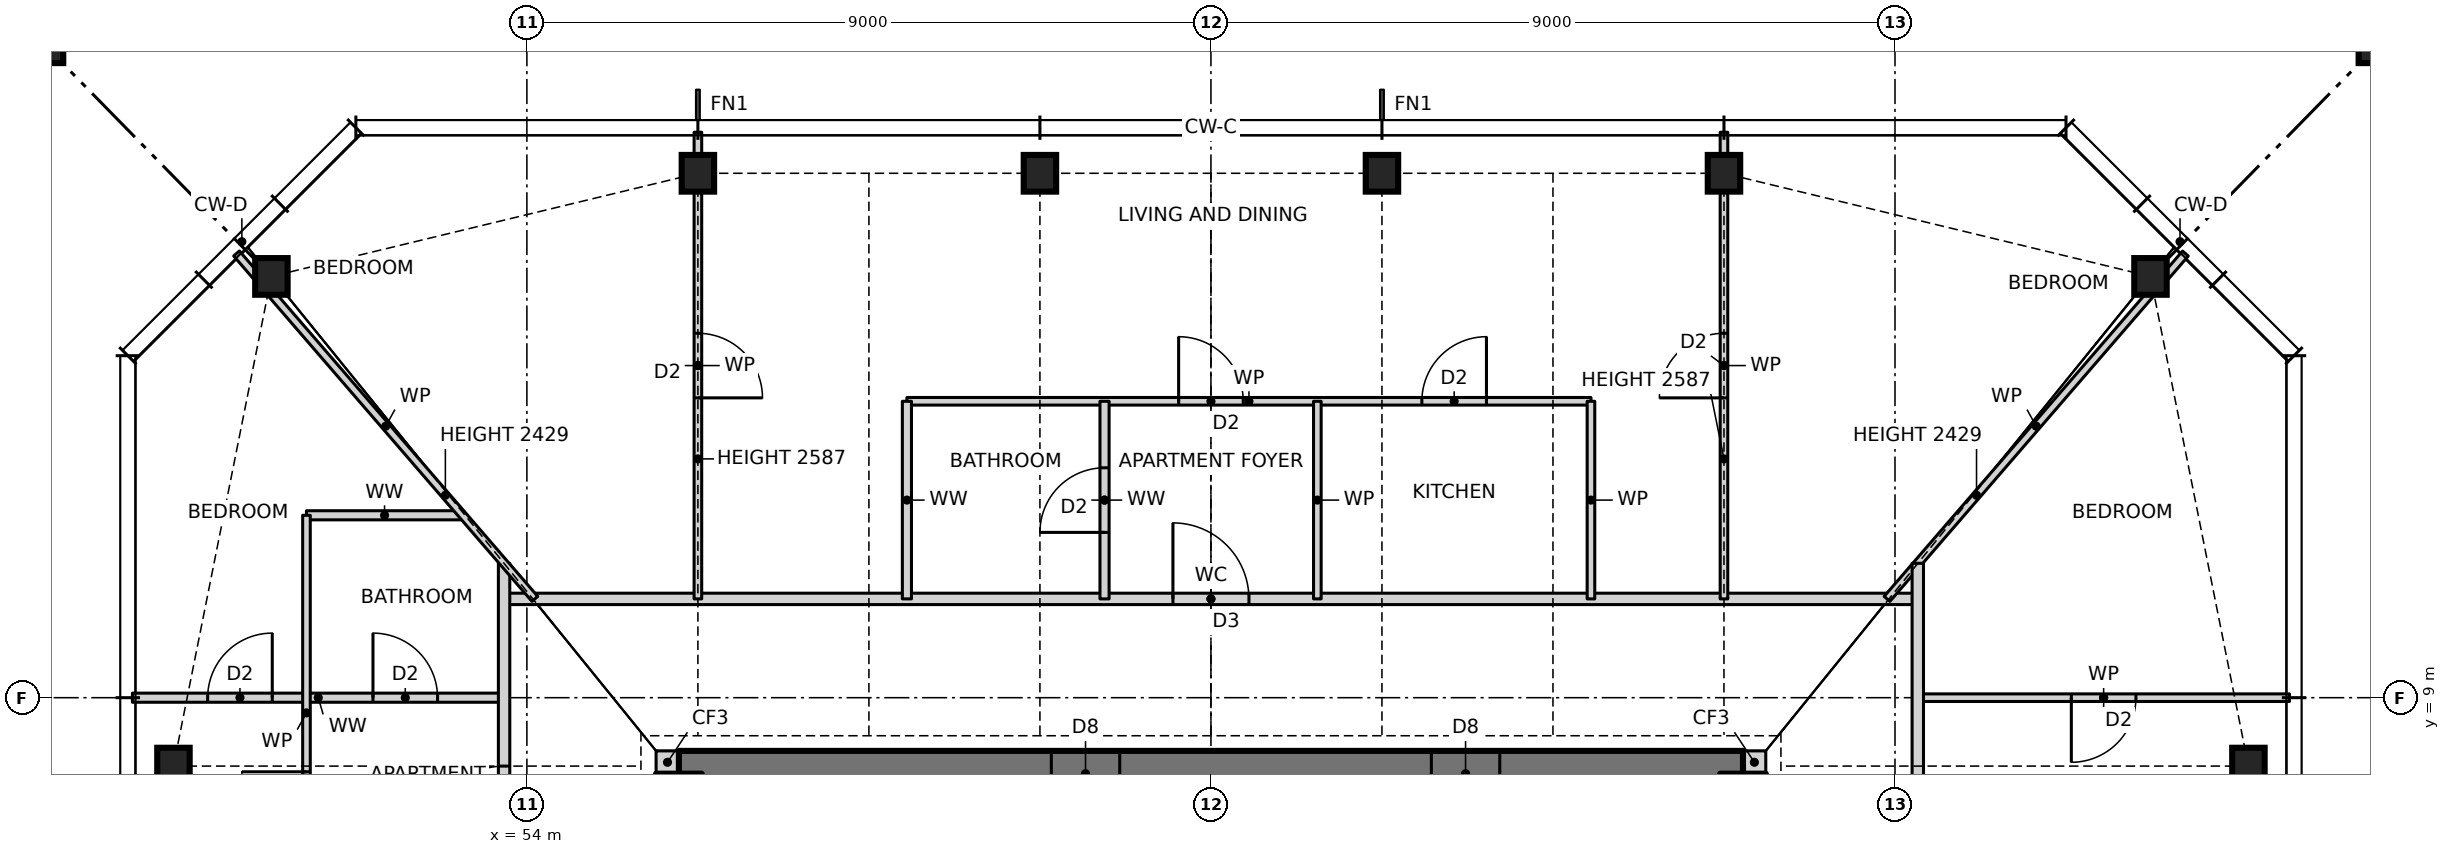
"""IFC4 building model, lengths in metres.
Left out: names, types, materials, properties, quantities, classifications, styles, units other than length and angle.
Written with IfcOpenShell. Run it as: python <this file> out.ifc"""

import sys

from ifc_helpers import new_model, si_unit, direction, frame, frame_2d, origin, origin_2d, place, context, subcontext, project, spatial, rectangle, hollow_rectangle, i_section, extrude, element, fill, save


model = new_model("IFC4")
c1 = context("Model", 3, precision=1e-05, world=origin(), true_north=direction((0.0, 1.0)))
c2 = subcontext(c1, "Body", "Model", "MODEL_VIEW")
j1 = project(units=[si_unit("LENGTHUNIT", "METRE"), si_unit("PLANEANGLEUNIT", "RADIAN")], contexts=[c1])
p1 = place(None, origin())
s1 = spatial("IfcSite", under=j1, at=p1, CompositionType="ELEMENT")
p2 = place(p1, origin())
s2 = spatial("IfcBuilding", under=s1, at=p2, CompositionType="ELEMENT")
p3 = place(p2, frame((0.0, 0.0, 87.5)))
s3 = spatial("IfcBuildingStorey", under=s2, at=p3, CompositionType="ELEMENT", Elevation=87.5)
for number, where, z_axis, x_axis in (
    (1, (76.65, 8.1, 0.0), (0.0, 0.0, 1.0), (1.0, 0.0, 0.0)),
    (2, (75.361, 14.543, 0.0), (0.0, 0.0, 1.0), (1.0, 0.0, 0.0)),
    (3, (69.75, 15.9, 0.0), (0.0, 0.0, 1.0), (1.0, 0.0, 0.0)),
    (4, (65.25, 15.9, 0.0), (0.0, 0.0, 1.0), (1.0, 0.0, 0.0)),
    (5, (60.75, 15.9, 0.0), (0.0, 0.0, 1.0), (1.0, 0.0, 0.0)),
    (6, (56.25, 15.9, 0.0), (0.0, 0.0, 1.0), (1.0, 0.0, 0.0)),
    (7, (50.639, 14.543, 0.0), (0.0, 0.0, 1.0), (1.0, 0.0, 0.0)),
    (8, (49.35, 8.1, 0.0), (0.0, 0.0, 1.0), (1.0, 0.0, 0.0)),
):
    element("IfcColumn", number, at=place(p3, frame(where, z_axis=z_axis, x_axis=x_axis)), inside=s3, PredefinedType="COLUMN", context=c2, shape_type="SweptSolid", body=[
        extrude(i_section(OverallWidth=0.427, OverallDepth=0.483, WebThickness=0.051, FlangeThickness=0.082, at=origin_2d()), origin(), (0.0, 0.0, 1.0), 3.5),
    ])
for number, where, z_axis, x_axis in (
    (9, (78.65, 17.9, 0.0), (0.0, 0.0, 1.0), (1.0, 0.0, 0.0)),
    (10, (47.35, 17.9, 0.0), (0.0, 0.0, 1.0), (1.0, 0.0, 0.0)),
):
    element("IfcColumn", number, at=place(p3, frame(where, z_axis=z_axis, x_axis=x_axis)), inside=s3, PredefinedType="COLUMN", context=c2, shape_type="SweptSolid", body=[
        extrude(hollow_rectangle(XDim=1.1, YDim=1.1, WallThickness=0.06, at=origin_2d()), origin(), (0.0, 0.0, 1.0), 3.5),
    ])
for number, where, z_axis, x_axis in (
    (11, (70.0, 8.15, 0.0), (0.0, 0.0, 1.0), (1.0, 0.0, 0.0)),
    (12, (55.7, 8.15, 0.0), (0.0, 0.0, 1.0), (1.0, 0.0, 0.0)),
):
    element("IfcWall", number, at=place(p3, frame(where, z_axis=z_axis, x_axis=x_axis)), inside=s3, PredefinedType="SOLIDWALL", context=c2, shape_type="SweptSolid", body=[
        extrude(rectangle(XDim=0.3, YDim=0.3, at=frame_2d((0.15, 0.0))), origin(), (0.0, 0.0, 1.0), 3.5),
    ])
p4 = place(p3, frame((70.0, 8.0, 0.0), z_axis=(0.0, 0.0, 1.0), x_axis=(-1.0, 0.0, 0.0)))
e13 = element("IfcWall", 13, at=p4, inside=s3, PredefinedType="SHEAR", context=c2, shape_type="SweptSolid", body=[
    extrude(rectangle(XDim=14.0, YDim=0.6, at=frame_2d((7.0, 0.0))), origin(), (0.0, 0.0, 1.0), 3.5),
])
p5 = place(p4, frame((8.2, 0.0, 0.0)))
e14 = element("IfcOpeningElement", 14, at=p5, cuts=e13, PredefinedType="OPENING", context=c2, shape_type="SweptSolid", body=[
    extrude(rectangle(XDim=0.9, YDim=2.1, at=frame_2d((0.45, 1.05))), frame((0.0, 0.31, 0.0), z_axis=(0.0, -1.0, 0.0), x_axis=(1.0, 0.0, 0.0)), (0.0, 0.0, 1.0), 0.62),
])
p6 = place(p4, frame((3.2, 0.0, 0.0)))
e15 = element("IfcOpeningElement", 15, at=p6, cuts=e13, PredefinedType="OPENING", context=c2, shape_type="SweptSolid", body=[
    extrude(rectangle(XDim=0.9, YDim=2.1, at=frame_2d((0.45, 1.05))), frame((0.0, 0.31, 0.0), z_axis=(0.0, -1.0, 0.0), x_axis=(1.0, 0.0, 0.0)), (0.0, 0.0, 1.0), 0.62),
])
p7 = place(p3, frame((48.81, 9.0, 0.0), z_axis=(0.0, 0.0, 1.0), x_axis=(1.0, 0.0, 0.0)))
e16 = element("IfcWall", 16, at=p7, inside=s3, PredefinedType="PARTITIONING", context=c2, shape_type="SweptSolid", body=[
    extrude(rectangle(XDim=4.89, YDim=0.12, at=frame_2d((2.445, 0.0))), origin(), (0.0, 0.0, 1.0), 3.27),
])
p8 = place(p7, frame((3.165, 0.0, 0.0)))
e17 = element("IfcOpeningElement", 17, at=p8, cuts=e16, PredefinedType="OPENING", context=c2, shape_type="SweptSolid", body=[
    extrude(rectangle(XDim=0.85, YDim=2.1, at=frame_2d((0.425, 1.05))), frame((0.0, 0.07, 0.0), z_axis=(0.0, -1.0, 0.0), x_axis=(1.0, 0.0, 0.0)), (0.0, 0.0, 1.0), 0.14),
])
p9 = place(p7, frame((0.99, 0.0, 0.0)))
e18 = element("IfcOpeningElement", 18, at=p9, cuts=e16, PredefinedType="OPENING", context=c2, shape_type="SweptSolid", body=[
    extrude(rectangle(XDim=0.85, YDim=2.1, at=frame_2d((0.425, 1.05))), frame((0.0, 0.07, 0.0), z_axis=(0.0, -1.0, 0.0), x_axis=(1.0, 0.0, 0.0)), (0.0, 0.0, 1.0), 0.14),
])
p10 = place(p3, frame((72.3, 9.0, 0.0), z_axis=(0.0, 0.0, 1.0), x_axis=(1.0, 0.0, 0.0)))
e19 = element("IfcWall", 19, at=p10, inside=s3, PredefinedType="PARTITIONING", context=c2, shape_type="SweptSolid", body=[
    extrude(rectangle(XDim=4.89, YDim=0.1, at=frame_2d((2.445, 0.0))), origin(), (0.0, 0.0, 1.0), 3.27),
])
p11 = place(p10, frame((2.02, 0.0, 0.0)))
e20 = element("IfcOpeningElement", 20, at=p11, cuts=e19, PredefinedType="OPENING", context=c2, shape_type="SweptSolid", body=[
    extrude(rectangle(XDim=0.85, YDim=2.1, at=frame_2d((0.425, 1.05))), frame((0.0, 0.06, 0.0), z_axis=(0.0, -1.0, 0.0), x_axis=(1.0, 0.0, 0.0)), (0.0, 0.0, 1.0), 0.12),
])
p12 = place(p3, frame((53.7, 10.3, 0.0), z_axis=(0.0, 0.0, 1.0), x_axis=(1.0, 0.0, 0.0)))
e21 = element("IfcWall", 21, at=p12, inside=s3, PredefinedType="PARTITIONING", context=c2, shape_type="SweptSolid", body=[
    extrude(rectangle(XDim=18.6, YDim=0.15, at=frame_2d((9.3, 0.0))), origin(), (0.0, 0.0, 1.0), 3.27),
])
p13 = place(p12, frame((8.8, 0.0, 0.0)))
e22 = element("IfcOpeningElement", 22, at=p13, cuts=e21, PredefinedType="OPENING", context=c2, shape_type="SweptSolid", body=[
    extrude(rectangle(XDim=1.0, YDim=2.1, at=frame_2d((0.5, 1.05))), frame((0.0, 0.085, 0.0), z_axis=(0.0, -1.0, 0.0), x_axis=(1.0, 0.0, 0.0)), (0.0, 0.0, 1.0), 0.17),
])
p14 = place(p3, frame((51.1, 11.4, 0.0), z_axis=(0.0, 0.0, 1.0), x_axis=(1.0, 0.0, 0.0)))
e23 = element("IfcWall", 23, at=p14, inside=s3, PredefinedType="PARTITIONING", context=c2, shape_type="SweptSolid", body=[
    extrude(rectangle(XDim=2.055, YDim=0.12, at=frame_2d((1.027, 0.0))), origin(), (0.0, 0.0, 1.0), 3.27),
])
p15 = place(p3, frame((59.0, 12.9, 0.0), z_axis=(0.0, 0.0, 1.0), x_axis=(1.0, 0.0, 0.0)))
e24 = element("IfcWall", 24, at=p15, inside=s3, PredefinedType="PARTITIONING", context=c2, shape_type="SweptSolid", body=[
    extrude(rectangle(XDim=9.0, YDim=0.1, at=frame_2d((4.5, 0.0))), origin(), (0.0, 0.0, 1.0), 3.27),
])
p16 = place(p15, frame((6.775, 0.0, 0.0)))
e25 = element("IfcOpeningElement", 25, at=p16, cuts=e24, PredefinedType="OPENING", context=c2, shape_type="SweptSolid", body=[
    extrude(rectangle(XDim=0.85, YDim=2.1, at=frame_2d((0.425, 1.05))), frame((0.0, 0.06, 0.0), z_axis=(0.0, -1.0, 0.0), x_axis=(1.0, 0.0, 0.0)), (0.0, 0.0, 1.0), 0.12),
])
p17 = place(p15, frame((3.575, 0.0, 0.0)))
e26 = element("IfcOpeningElement", 26, at=p17, cuts=e24, PredefinedType="OPENING", context=c2, shape_type="SweptSolid", body=[
    extrude(rectangle(XDim=0.85, YDim=2.1, at=frame_2d((0.425, 1.05))), frame((0.0, 0.06, 0.0), z_axis=(0.0, -1.0, 0.0), x_axis=(1.0, 0.0, 0.0)), (0.0, 0.0, 1.0), 0.12),
])
p18 = place(p3, frame((71.895, 10.3, 0.0), z_axis=(0.0, 0.0, 1.0), x_axis=(0.65378286253, 0.756682211144, 0.0)))
e27 = element("IfcWall", 27, at=p18, inside=s3, PredefinedType="PARTITIONING", context=c2, shape_type="SweptSolid", body=[
    extrude(rectangle(XDim=6.005, YDim=0.1, at=frame_2d((3.002, 0.0))), origin(), (0.0, 0.0, 1.0), 2.429),
])
p19 = place(p3, frame((72.3, -10.9, 0.0), z_axis=(0.0, 0.0, 1.0), x_axis=(0.0, 1.0, 0.0)))
e28 = element("IfcWall", 28, at=p19, inside=s3, PredefinedType="PARTITIONING", context=c2, shape_type="SweptSolid", body=[
    extrude(rectangle(XDim=21.668, YDim=0.15, at=frame_2d((10.834, 0.0))), origin(), (0.0, 0.0, 1.0), 3.27),
])
p20 = place(p19, frame((10.4, 0.0, 0.0)))
e29 = element("IfcOpeningElement", 29, at=p20, cuts=e28, PredefinedType="OPENING", context=c2, shape_type="SweptSolid", body=[
    extrude(rectangle(XDim=1.0, YDim=2.1, at=frame_2d((0.5, 1.05))), frame((0.0, 0.085, 0.0), z_axis=(0.0, -1.0, 0.0), x_axis=(1.0, 0.0, 0.0)), (0.0, 0.0, 1.0), 0.17),
])
p21 = place(p3, frame((69.75, 10.3, 0.0), z_axis=(0.0, 0.0, 1.0), x_axis=(0.0, 1.0, 0.0)))
e30 = element("IfcWall", 30, at=p21, inside=s3, PredefinedType="PARTITIONING", context=c2, shape_type="SweptSolid", body=[
    extrude(rectangle(XDim=6.14, YDim=0.1, at=frame_2d((3.07, 0.0))), origin(), (0.0, 0.0, 1.0), 2.587),
])
p22 = place(p21, frame((2.645, 0.0, 0.0)))
e31 = element("IfcOpeningElement", 31, at=p22, cuts=e30, PredefinedType="OPENING", context=c2, shape_type="SweptSolid", body=[
    extrude(rectangle(XDim=0.85, YDim=2.1, at=frame_2d((0.425, 1.05))), frame((0.0, 0.06, 0.0), z_axis=(0.0, -1.0, 0.0), x_axis=(1.0, 0.0, 0.0)), (0.0, 0.0, 1.0), 0.12),
])
for number, where, z_axis, x_axis in (
    (32, (68.0, 10.3, 0.0), (0.0, 0.0, 1.0), (0.0, 1.0, 0.0)),
    (33, (64.4, 10.3, 0.0), (0.0, 0.0, 1.0), (0.0, 1.0, 0.0)),
):
    element("IfcWall", number, at=place(p3, frame(where, z_axis=z_axis, x_axis=x_axis)), inside=s3, PredefinedType="PARTITIONING", context=c2, shape_type="SweptSolid", body=[
        extrude(rectangle(XDim=2.6, YDim=0.1, at=frame_2d((1.3, 0.0))), origin(), (0.0, 0.0, 1.0), 3.27),
    ])
p23 = place(p3, frame((61.6, 10.3, 0.0), z_axis=(0.0, 0.0, 1.0), x_axis=(0.0, 1.0, 0.0)))
e34 = element("IfcWall", 34, at=p23, inside=s3, PredefinedType="PARTITIONING", context=c2, shape_type="SweptSolid", body=[
    extrude(rectangle(XDim=2.6, YDim=0.12, at=frame_2d((1.3, 0.0))), origin(), (0.0, 0.0, 1.0), 3.27),
])
p24 = place(p23, frame((0.875, 0.0, 0.0)))
e35 = element("IfcOpeningElement", 35, at=p24, cuts=e34, PredefinedType="OPENING", context=c2, shape_type="SweptSolid", body=[
    extrude(rectangle(XDim=0.85, YDim=2.1, at=frame_2d((0.425, 1.05))), frame((0.0, 0.07, 0.0), z_axis=(0.0, -1.0, 0.0), x_axis=(1.0, 0.0, 0.0)), (0.0, 0.0, 1.0), 0.14),
])
p25 = place(p3, frame((59.0, 10.3, 0.0), z_axis=(0.0, 0.0, 1.0), x_axis=(0.0, 1.0, 0.0)))
e36 = element("IfcWall", 36, at=p25, inside=s3, PredefinedType="PARTITIONING", context=c2, shape_type="SweptSolid", body=[
    extrude(rectangle(XDim=2.6, YDim=0.12, at=frame_2d((1.3, 0.0))), origin(), (0.0, 0.0, 1.0), 3.27),
])
p26 = place(p3, frame((56.25, 10.3, 0.0), z_axis=(0.0, 0.0, 1.0), x_axis=(0.0, 1.0, 0.0)))
e37 = element("IfcWall", 37, at=p26, inside=s3, PredefinedType="PARTITIONING", context=c2, shape_type="SweptSolid", body=[
    extrude(rectangle(XDim=6.14, YDim=0.1, at=frame_2d((3.07, 0.0))), origin(), (0.0, 0.0, 1.0), 2.587),
])
p27 = place(p26, frame((2.645, 0.0, 0.0)))
e38 = element("IfcOpeningElement", 38, at=p27, cuts=e37, PredefinedType="OPENING", context=c2, shape_type="SweptSolid", body=[
    extrude(rectangle(XDim=0.85, YDim=2.1, at=frame_2d((0.425, 1.05))), frame((0.0, 0.06, 0.0), z_axis=(0.0, -1.0, 0.0), x_axis=(1.0, 0.0, 0.0)), (0.0, 0.0, 1.0), 0.12),
])
p28 = place(p3, frame((53.7, -10.9, 0.0), z_axis=(0.0, 0.0, 1.0), x_axis=(0.0, 1.0, 0.0)))
e39 = element("IfcWall", 39, at=p28, inside=s3, PredefinedType="PARTITIONING", context=c2, shape_type="SweptSolid", body=[
    extrude(rectangle(XDim=21.668, YDim=0.15, at=frame_2d((10.834, 0.0))), origin(), (0.0, 0.0, 1.0), 3.27),
])
p29 = place(p28, frame((18.0, 0.0, 0.0)))
e40 = element("IfcOpeningElement", 40, at=p29, cuts=e39, PredefinedType="OPENING", context=c2, shape_type="SweptSolid", body=[
    extrude(rectangle(XDim=1.0, YDim=2.1, at=frame_2d((0.5, 1.05))), frame((0.0, 0.085, 0.0), z_axis=(0.0, -1.0, 0.0), x_axis=(1.0, 0.0, 0.0)), (0.0, 0.0, 1.0), 0.17),
])
p30 = place(p28, frame((5.4, 0.0, 0.0)))
e41 = element("IfcOpeningElement", 41, at=p30, cuts=e39, PredefinedType="OPENING", context=c2, shape_type="SweptSolid", body=[
    extrude(rectangle(XDim=1.0, YDim=2.1, at=frame_2d((0.5, 1.05))), frame((0.0, 0.085, 0.0), z_axis=(0.0, -1.0, 0.0), x_axis=(1.0, 0.0, 0.0)), (0.0, 0.0, 1.0), 0.17),
])
p31 = place(p3, frame((51.1, 6.2, 0.0), z_axis=(0.0, 0.0, 1.0), x_axis=(0.0, 1.0, 0.0)))
e42 = element("IfcWall", 42, at=p31, inside=s3, PredefinedType="PARTITIONING", context=c2, shape_type="SweptSolid", body=[
    extrude(rectangle(XDim=5.2, YDim=0.1, at=frame_2d((2.6, 0.0))), origin(), (0.0, 0.0, 1.0), 3.27),
])
p32 = place(p31, frame((0.975, 0.0, 0.0)))
e43 = element("IfcOpeningElement", 43, at=p32, cuts=e42, PredefinedType="OPENING", context=c2, shape_type="SweptSolid", body=[
    extrude(rectangle(XDim=0.85, YDim=2.1, at=frame_2d((0.425, 1.05))), frame((0.0, 0.06, 0.0), z_axis=(0.0, -1.0, 0.0), x_axis=(1.0, 0.0, 0.0)), (0.0, 0.0, 1.0), 0.12),
])
p33 = place(p3, frame((54.105, 10.3, 0.0), z_axis=(0.0, 0.0, 1.0), x_axis=(-0.653606109319, 0.756834892074, 0.0)))
e44 = element("IfcWall", 44, at=p33, inside=s3, PredefinedType="PARTITIONING", context=c2, shape_type="SweptSolid", body=[
    extrude(rectangle(XDim=6.005, YDim=0.1, at=frame_2d((3.002, 0.0))), origin(), (0.0, 0.0, 1.0), 2.429),
])
p34 = place(p11, frame((0.85, 0.0, 0.0), z_axis=(0.0, 0.0, 1.0), x_axis=(-1.0, 0.0, 0.0)))
e45 = element("IfcDoor", 45, at=p34, inside=s3, OperationType="SINGLE_SWING_RIGHT", PredefinedType="DOOR", context=c2, shape_type="SweptSolid", body=[
    extrude(rectangle(XDim=0.85, YDim=2.1, at=frame_2d((0.425, 1.05))), frame((0.0, 0.025, 0.0), z_axis=(0.0, -1.0, 0.0), x_axis=(1.0, 0.0, 0.0)), (0.0, 0.0, 1.0), 0.05),
])
fill(e20, e45)
p35 = place(p16, origin())
e46 = element("IfcDoor", 46, at=p35, inside=s3, OperationType="SINGLE_SWING_RIGHT", PredefinedType="DOOR", context=c2, shape_type="SweptSolid", body=[
    extrude(rectangle(XDim=0.85, YDim=2.1, at=frame_2d((0.425, 1.05))), frame((0.0, 0.025, 0.0), z_axis=(0.0, -1.0, 0.0), x_axis=(1.0, 0.0, 0.0)), (0.0, 0.0, 1.0), 0.05),
])
fill(e25, e46)
p36 = place(p13, origin())
e47 = element("IfcDoor", 47, at=p36, inside=s3, OperationType="SINGLE_SWING_LEFT", PredefinedType="DOOR", context=c2, shape_type="SweptSolid", body=[
    extrude(rectangle(XDim=1.0, YDim=2.1, at=frame_2d((0.5, 1.05))), frame((0.0, 0.025, 0.0), z_axis=(0.0, -1.0, 0.0), x_axis=(1.0, 0.0, 0.0)), (0.0, 0.0, 1.0), 0.05),
])
fill(e22, e47)
p37 = place(p17, origin())
e48 = element("IfcDoor", 48, at=p37, inside=s3, OperationType="SINGLE_SWING_LEFT", PredefinedType="DOOR", context=c2, shape_type="SweptSolid", body=[
    extrude(rectangle(XDim=0.85, YDim=2.1, at=frame_2d((0.425, 1.05))), frame((0.0, 0.025, 0.0), z_axis=(0.0, -1.0, 0.0), x_axis=(1.0, 0.0, 0.0)), (0.0, 0.0, 1.0), 0.05),
])
fill(e26, e48)
p38 = place(p24, origin())
e49 = element("IfcDoor", 49, at=p38, inside=s3, OperationType="SINGLE_SWING_LEFT", PredefinedType="DOOR", context=c2, shape_type="SweptSolid", body=[
    extrude(rectangle(XDim=0.85, YDim=2.1, at=frame_2d((0.425, 1.05))), frame((0.0, 0.025, 0.0), z_axis=(0.0, -1.0, 0.0), x_axis=(1.0, 0.0, 0.0)), (0.0, 0.0, 1.0), 0.05),
])
fill(e35, e49)
p39 = place(p22, origin())
e50 = element("IfcDoor", 50, at=p39, inside=s3, OperationType="SINGLE_SWING_LEFT", PredefinedType="DOOR", context=c2, shape_type="SweptSolid", body=[
    extrude(rectangle(XDim=0.85, YDim=2.1, at=frame_2d((0.425, 1.05))), frame((0.0, 0.025, 0.0), z_axis=(0.0, -1.0, 0.0), x_axis=(1.0, 0.0, 0.0)), (0.0, 0.0, 1.0), 0.05),
])
fill(e31, e50)
p40 = place(p27, frame((0.85, 0.0, 0.0), z_axis=(0.0, 0.0, 1.0), x_axis=(-1.0, 0.0, 0.0)))
e51 = element("IfcDoor", 51, at=p40, inside=s3, OperationType="SINGLE_SWING_RIGHT", PredefinedType="DOOR", context=c2, shape_type="SweptSolid", body=[
    extrude(rectangle(XDim=0.85, YDim=2.1, at=frame_2d((0.425, 1.05))), frame((0.0, 0.025, 0.0), z_axis=(0.0, -1.0, 0.0), x_axis=(1.0, 0.0, 0.0)), (0.0, 0.0, 1.0), 0.05),
])
fill(e38, e51)
p41 = place(p29, origin())
e52 = element("IfcDoor", 52, at=p41, inside=s3, OperationType="SINGLE_SWING_LEFT", PredefinedType="DOOR", context=c2, shape_type="SweptSolid", body=[
    extrude(rectangle(XDim=1.0, YDim=2.1, at=frame_2d((0.5, 1.05))), frame((0.0, 0.025, 0.0), z_axis=(0.0, -1.0, 0.0), x_axis=(1.0, 0.0, 0.0)), (0.0, 0.0, 1.0), 0.05),
])
fill(e40, e52)
p42 = place(p32, origin())
e53 = element("IfcDoor", 53, at=p42, inside=s3, OperationType="SINGLE_SWING_RIGHT", PredefinedType="DOOR", context=c2, shape_type="SweptSolid", body=[
    extrude(rectangle(XDim=0.85, YDim=2.1, at=frame_2d((0.425, 1.05))), frame((0.0, 0.025, 0.0), z_axis=(0.0, -1.0, 0.0), x_axis=(1.0, 0.0, 0.0)), (0.0, 0.0, 1.0), 0.05),
])
fill(e43, e53)
p43 = place(p8, origin())
e54 = element("IfcDoor", 54, at=p43, inside=s3, OperationType="SINGLE_SWING_LEFT", PredefinedType="DOOR", context=c2, shape_type="SweptSolid", body=[
    extrude(rectangle(XDim=0.85, YDim=2.1, at=frame_2d((0.425, 1.05))), frame((0.0, 0.025, 0.0), z_axis=(0.0, -1.0, 0.0), x_axis=(1.0, 0.0, 0.0)), (0.0, 0.0, 1.0), 0.05),
])
fill(e17, e54)
p44 = place(p9, origin())
e55 = element("IfcDoor", 55, at=p44, inside=s3, OperationType="SINGLE_SWING_RIGHT", PredefinedType="DOOR", context=c2, shape_type="SweptSolid", body=[
    extrude(rectangle(XDim=0.85, YDim=2.1, at=frame_2d((0.425, 1.05))), frame((0.0, 0.025, 0.0), z_axis=(0.0, -1.0, 0.0), x_axis=(1.0, 0.0, 0.0)), (0.0, 0.0, 1.0), 0.05),
])
fill(e18, e55)
p45 = place(p5, origin())
e56 = element("IfcDoor", 56, at=p45, inside=s3, OperationType="SINGLE_SWING_RIGHT", PredefinedType="DOOR", context=c2, shape_type="SweptSolid", body=[
    extrude(rectangle(XDim=0.9, YDim=2.1, at=frame_2d((0.45, 1.05))), frame((0.0, 0.025, 0.0), z_axis=(0.0, -1.0, 0.0), x_axis=(1.0, 0.0, 0.0)), (0.0, 0.0, 1.0), 0.05),
])
fill(e14, e56)
p46 = place(p6, origin())
e57 = element("IfcDoor", 57, at=p46, inside=s3, OperationType="SINGLE_SWING_RIGHT", PredefinedType="DOOR", context=c2, shape_type="SweptSolid", body=[
    extrude(rectangle(XDim=0.9, YDim=2.1, at=frame_2d((0.45, 1.05))), frame((0.0, 0.025, 0.0), z_axis=(0.0, -1.0, 0.0), x_axis=(1.0, 0.0, 0.0)), (0.0, 0.0, 1.0), 0.05),
])
fill(e15, e57)
save(model, sys.argv[1])
